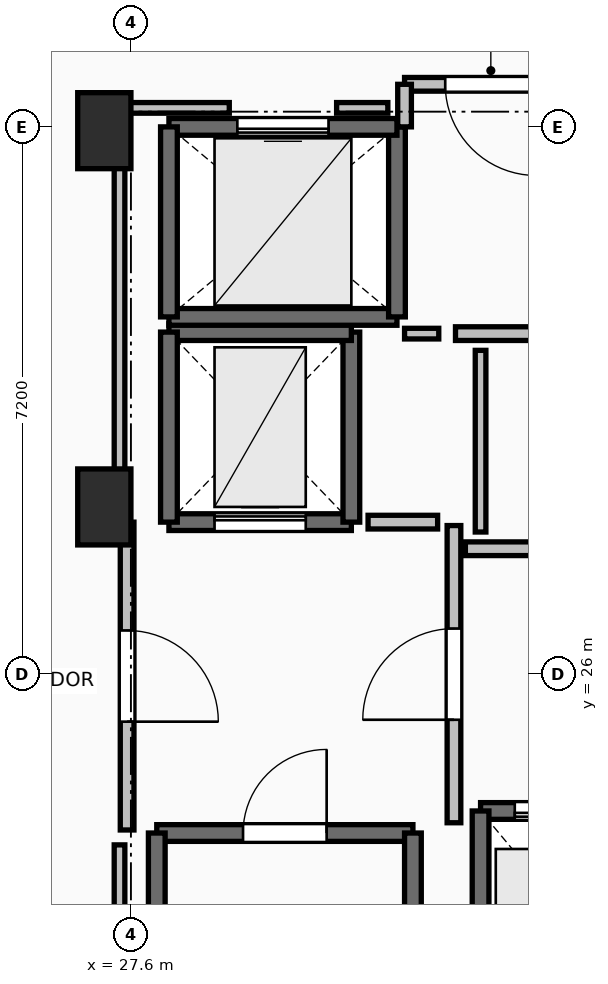
"""IFC4 building model, lengths in metres.
Left out: names, types, materials, properties, quantities, classifications, styles, units other than length and angle.
Written with IfcOpenShell. Run it as: python <this file> out.ifc"""

import sys

from ifc_helpers import new_model, si_unit, direction, frame, frame_2d, origin, origin_2d, place, context, subcontext, project, spatial, rectangle, extrude, element, fill, save


model = new_model("IFC4")
c1 = context("Model", 3, precision=1e-05, world=origin(), true_north=direction((0.0, 1.0)))
c2 = subcontext(c1, "Body", "Model", "MODEL_VIEW")
j1 = project(units=[si_unit("LENGTHUNIT", "METRE"), si_unit("PLANEANGLEUNIT", "RADIAN")], contexts=[c1])
p1 = place(None, origin())
s1 = spatial("IfcSite", under=j1, at=p1, CompositionType="ELEMENT")
p2 = place(p1, origin())
s2 = spatial("IfcBuilding", under=s1, at=p2, CompositionType="ELEMENT")
p3 = place(p2, frame((0.0, 0.0, 214.3)))
s3 = spatial("IfcBuildingStorey", under=s2, at=p3, CompositionType="ELEMENT", Elevation=214.3)
for number, where, z_axis, x_axis in (
    (1, (27.25, 28.2, 0.0), (0.0, 0.0, 1.0), (1.0, 0.0, 0.0)),
    (2, (27.25, 33.15, 0.0), (0.0, 0.0, 1.0), (1.0, 0.0, 0.0)),
):
    element("IfcColumn", number, at=place(p3, frame(where, z_axis=z_axis, x_axis=x_axis)), inside=s3, PredefinedType="PILASTER", context=c2, shape_type="SweptSolid", body=[
        extrude(rectangle(XDim=0.7, YDim=1.0, at=origin_2d()), origin(), (0.0, 0.0, 1.0), 3.55),
    ])
p4 = place(p3, frame((27.94, 23.91, 0.0), z_axis=(0.0, 0.0, 1.0), x_axis=(1.0, 0.0, 0.0)))
e3 = element("IfcWall", 3, at=p4, inside=s3, PredefinedType="SOLIDWALL", context=c2, shape_type="SweptSolid", body=[
    extrude(rectangle(XDim=3.37, YDim=0.22, at=frame_2d((1.685, 0.0))), origin(), (0.0, 0.0, 1.0), 3.29),
])
p5 = place(p4, frame((1.135, 0.0, 0.0)))
e4 = element("IfcOpeningElement", 4, at=p5, cuts=e3, PredefinedType="OPENING", context=c2, shape_type="SweptSolid", body=[
    extrude(rectangle(XDim=1.1, YDim=2.15, at=frame_2d((0.55, 1.075))), frame((0.0, 0.125, 0.0), z_axis=(0.0, -1.0, 0.0), x_axis=(1.0, 0.0, 0.0)), (0.0, 0.0, 1.0), 0.25),
])
for number, where, z_axis, x_axis in (
    (5, (31.31, 23.91, 0.0), (0.0, 0.0, 1.0), (0.0, -1.0, 0.0)),
    (6, (27.94, 16.49, 0.0), (0.0, 0.0, 1.0), (0.0, 1.0, 0.0)),
):
    element("IfcWall", number, at=place(p3, frame(where, z_axis=z_axis, x_axis=x_axis)), inside=s3, PredefinedType="SOLIDWALL", context=c2, shape_type="SweptSolid", body=[
        extrude(rectangle(XDim=7.42, YDim=0.22, at=frame_2d((3.71, 0.0))), origin(), (0.0, 0.0, 1.0), 3.29),
    ])
p6 = place(p3, frame((34.2, 24.2, 0.0), z_axis=(0.0, 0.0, 1.0), x_axis=(-1.0, 0.0, 0.0)))
e7 = element("IfcWall", 7, at=p6, inside=s3, PredefinedType="SOLIDWALL", context=c2, shape_type="SweptSolid", body=[
    extrude(rectangle(XDim=2.0, YDim=0.22, at=frame_2d((1.0, 0.0))), origin(), (0.0, 0.0, 1.0), 3.29),
])
p7 = place(p6, frame((0.45, 0.0, 0.0)))
e8 = element("IfcOpeningElement", 8, at=p7, cuts=e7, PredefinedType="OPENING", context=c2, shape_type="SweptSolid", body=[
    extrude(rectangle(XDim=1.1, YDim=2.2, at=frame_2d((0.55, 1.1))), frame((0.0, 0.125, 0.0), z_axis=(0.0, -1.0, 0.0), x_axis=(1.0, 0.0, 0.0)), (0.0, 0.0, 1.0), 0.25),
])
p8 = place(p3, frame((32.2, 24.2, 0.0), z_axis=(0.0, 0.0, 1.0), x_axis=(0.0, -1.0, 0.0)))
e9 = element("IfcWall", 9, at=p8, inside=s3, PredefinedType="SOLIDWALL", context=c2, shape_type="SweptSolid", body=[
    extrude(rectangle(XDim=2.4, YDim=0.22, at=frame_2d((1.2, 0.0))), origin(), (0.0, 0.0, 1.0), 3.29),
])
p9 = place(p3, frame((28.1, 28.0, 0.0), z_axis=(0.0, 0.0, 1.0), x_axis=(1.0, 0.0, 0.0)))
e10 = element("IfcWall", 10, at=p9, inside=s3, PredefinedType="SHEAR", context=c2, shape_type="SweptSolid", body=[
    extrude(rectangle(XDim=2.4, YDim=0.22, at=frame_2d((1.2, 0.0))), origin(), (0.0, 0.0, 1.0), 3.29),
])
p10 = place(p9, frame((0.6, 0.0, 0.0)))
e11 = element("IfcOpeningElement", 11, at=p10, cuts=e10, PredefinedType="OPENING", context=c2, shape_type="SweptSolid", body=[
    extrude(rectangle(XDim=1.2, YDim=2.2, at=frame_2d((0.6, 1.1))), frame((0.0, 0.125, 0.0), z_axis=(0.0, -1.0, 0.0), x_axis=(1.0, 0.0, 0.0)), (0.0, 0.0, 1.0), 0.25),
])
p11 = place(p3, frame((30.5, 28.0, 0.0), z_axis=(0.0, 0.0, 1.0), x_axis=(0.0, 1.0, 0.0)))
e12 = element("IfcWall", 12, at=p11, inside=s3, PredefinedType="SHEAR", context=c2, shape_type="SweptSolid", body=[
    extrude(rectangle(XDim=2.5, YDim=0.22, at=frame_2d((1.25, 0.0))), origin(), (0.0, 0.0, 1.0), 3.29),
])
p12 = place(p3, frame((30.5, 30.5, 0.0), z_axis=(0.0, 0.0, 1.0), x_axis=(-1.0, 0.0, 0.0)))
e13 = element("IfcWall", 13, at=p12, inside=s3, PredefinedType="SHEAR", context=c2, shape_type="SweptSolid", body=[
    extrude(rectangle(XDim=2.4, YDim=0.22, at=frame_2d((1.2, 0.0))), origin(), (0.0, 0.0, 1.0), 3.29),
])
p13 = place(p3, frame((28.1, 30.5, 0.0), z_axis=(0.0, 0.0, 1.0), x_axis=(0.0, -1.0, 0.0)))
e14 = element("IfcWall", 14, at=p13, inside=s3, PredefinedType="SHEAR", context=c2, shape_type="SweptSolid", body=[
    extrude(rectangle(XDim=2.5, YDim=0.22, at=frame_2d((1.25, 0.0))), origin(), (0.0, 0.0, 1.0), 3.29),
])
p14 = place(p3, frame((28.1, 30.7, 0.0), z_axis=(0.0, 0.0, 1.0), x_axis=(1.0, 0.0, 0.0)))
e15 = element("IfcWall", 15, at=p14, inside=s3, PredefinedType="SOLIDWALL", context=c2, shape_type="SweptSolid", body=[
    extrude(rectangle(XDim=3.0, YDim=0.22, at=frame_2d((1.5, 0.0))), origin(), (0.0, 0.0, 1.0), 3.29),
])
p15 = place(p3, frame((31.1, 30.7, 0.0), z_axis=(0.0, 0.0, 1.0), x_axis=(0.0, 1.0, 0.0)))
e16 = element("IfcWall", 16, at=p15, inside=s3, PredefinedType="SOLIDWALL", context=c2, shape_type="SweptSolid", body=[
    extrude(rectangle(XDim=2.5, YDim=0.22, at=frame_2d((1.25, 0.0))), origin(), (0.0, 0.0, 1.0), 3.29),
])
p16 = place(p3, frame((31.1, 33.2, 0.0), z_axis=(0.0, 0.0, 1.0), x_axis=(-1.0, 0.0, 0.0)))
e17 = element("IfcWall", 17, at=p16, inside=s3, PredefinedType="SOLIDWALL", context=c2, shape_type="SweptSolid", body=[
    extrude(rectangle(XDim=3.0, YDim=0.22, at=frame_2d((1.5, 0.0))), origin(), (0.0, 0.0, 1.0), 3.29),
])
p17 = place(p16, frame((0.9, 0.0, 0.0)))
e18 = element("IfcOpeningElement", 18, at=p17, cuts=e17, PredefinedType="OPENING", context=c2, shape_type="SweptSolid", body=[
    extrude(rectangle(XDim=1.2, YDim=2.2, at=frame_2d((0.6, 1.1))), frame((0.0, 0.125, 0.0), z_axis=(0.0, -1.0, 0.0), x_axis=(1.0, 0.0, 0.0)), (0.0, 0.0, 1.0), 0.25),
])
p18 = place(p3, frame((28.1, 33.2, 0.0), z_axis=(0.0, 0.0, 1.0), x_axis=(0.0, -1.0, 0.0)))
e19 = element("IfcWall", 19, at=p18, inside=s3, PredefinedType="SOLIDWALL", context=c2, shape_type="SweptSolid", body=[
    extrude(rectangle(XDim=2.5, YDim=0.22, at=frame_2d((1.25, 0.0))), origin(), (0.0, 0.0, 1.0), 3.29),
])
p19 = place(p3, frame((31.85, 24.045, 0.0), z_axis=(0.0, 0.0, 1.0), x_axis=(0.0, 1.0, 0.0)))
e20 = element("IfcWall", 20, at=p19, inside=s3, PredefinedType="PARTITIONING", context=c2, shape_type="SweptSolid", body=[
    extrude(rectangle(XDim=3.91, YDim=0.18, at=frame_2d((1.955, 0.0))), origin(), (0.0, 0.0, 1.0), 3.29),
])
p20 = place(p19, frame((1.355, 0.0, 0.0)))
e21 = element("IfcOpeningElement", 21, at=p20, cuts=e20, PredefinedType="OPENING", context=c2, shape_type="SweptSolid", body=[
    extrude(rectangle(XDim=1.2, YDim=2.15, at=frame_2d((0.6, 1.075))), frame((0.0, 0.105, 0.0), z_axis=(0.0, -1.0, 0.0), x_axis=(1.0, 0.0, 0.0)), (0.0, 0.0, 1.0), 0.21),
])
p21 = place(p3, frame((27.55, 28.0, 0.0), z_axis=(0.0, 0.0, 1.0), x_axis=(0.0, -1.0, 0.0)))
e22 = element("IfcWall", 22, at=p21, inside=s3, PredefinedType="PARTITIONING", context=c2, shape_type="SweptSolid", body=[
    extrude(rectangle(XDim=4.05, YDim=0.18, at=frame_2d((2.025, 0.0))), origin(), (0.0, 0.0, 1.0), 3.29),
])
p22 = place(p21, frame((1.425, 0.0, 0.0)))
e23 = element("IfcOpeningElement", 23, at=p22, cuts=e22, PredefinedType="OPENING", context=c2, shape_type="SweptSolid", body=[
    extrude(rectangle(XDim=1.2, YDim=2.15, at=frame_2d((0.6, 1.075))), frame((0.0, 0.105, 0.0), z_axis=(0.0, -1.0, 0.0), x_axis=(1.0, 0.0, 0.0)), (0.0, 0.0, 1.0), 0.21),
])
p23 = place(p3, frame((31.87, 30.48, 0.0), z_axis=(0.0, 0.0, 1.0), x_axis=(1.0, 0.0, 0.0)))
e24 = element("IfcWall", 24, at=p23, inside=s3, PredefinedType="PARTITIONING", context=c2, shape_type="SweptSolid", body=[
    extrude(rectangle(XDim=1.6, YDim=0.18, at=frame_2d((0.8, 0.0))), origin(), (0.0, 0.0, 1.0), 3.29),
])
p24 = place(p3, frame((33.47, 33.76, 0.0), z_axis=(0.0, 0.0, 1.0), x_axis=(-1.0, 0.0, 0.0)))
e25 = element("IfcWall", 25, at=p24, inside=s3, PredefinedType="PARTITIONING", context=c2, shape_type="SweptSolid", body=[
    extrude(rectangle(XDim=2.27, YDim=0.18, at=frame_2d((1.135, 0.0))), origin(), (0.0, 0.0, 1.0), 3.29),
])
p25 = place(p24, frame((0.535, 0.0, 0.0)))
e26 = element("IfcOpeningElement", 26, at=p25, cuts=e25, PredefinedType="OPENING", context=c2, shape_type="SweptSolid", body=[
    extrude(rectangle(XDim=1.2, YDim=2.15, at=frame_2d((0.6, 1.075))), frame((0.0, 0.105, 0.0), z_axis=(0.0, -1.0, 0.0), x_axis=(1.0, 0.0, 0.0)), (0.0, 0.0, 1.0), 0.21),
])
p26 = place(p3, frame((31.2, 33.76, 0.0), z_axis=(0.0, 0.0, 1.0), x_axis=(0.0, -1.0, 0.0)))
e27 = element("IfcWall", 27, at=p26, inside=s3, PredefinedType="PARTITIONING", context=c2, shape_type="SweptSolid", body=[
    extrude(rectangle(XDim=0.56, YDim=0.18, at=frame_2d((0.28, 0.0))), origin(), (0.0, 0.0, 1.0), 3.29),
])
p27 = place(p3, frame((35.04, 27.65, 0.0), z_axis=(0.0, 0.0, 1.0), x_axis=(-1.0, 0.0, 0.0)))
e28 = element("IfcWall", 28, at=p27, inside=s3, PredefinedType="PARTITIONING", context=c2, shape_type="SweptSolid", body=[
    extrude(rectangle(XDim=3.04, YDim=0.18, at=frame_2d((1.52, 0.0))), origin(), (0.0, 0.0, 1.0), 3.29),
])
p28 = place(p27, frame((1.02, 0.0, 0.0)))
e29 = element("IfcOpeningElement", 29, at=p28, cuts=e28, PredefinedType="OPENING", context=c2, shape_type="SweptSolid", body=[
    extrude(rectangle(XDim=1.0, YDim=2.15, at=frame_2d((0.5, 1.075))), frame((0.0, 0.105, 0.0), z_axis=(0.0, -1.0, 0.0), x_axis=(1.0, 0.0, 0.0)), (0.0, 0.0, 1.0), 0.21),
])
p29 = place(p3, frame((31.635, 28.0, 0.0), z_axis=(0.0, 0.0, 1.0), x_axis=(-1.0, 0.0, 0.0)))
e30 = element("IfcWall", 30, at=p29, inside=s3, PredefinedType="PARTITIONING", context=c2, shape_type="SweptSolid", body=[
    extrude(rectangle(XDim=0.915, YDim=0.18, at=frame_2d((0.458, 0.0))), origin(), (0.0, 0.0, 1.0), 3.29),
])
p30 = place(p3, frame((31.2, 30.48, 0.0), z_axis=(0.0, 0.0, 1.0), x_axis=(1.0, 0.0, 0.0)))
e31 = element("IfcWall", 31, at=p30, inside=s3, PredefinedType="PARTITIONING", context=c2, shape_type="SweptSolid", body=[
    extrude(rectangle(XDim=0.45, YDim=0.14, at=frame_2d((0.225, 0.0))), origin(), (0.0, 0.0, 1.0), 3.29),
])
p31 = place(p3, frame((32.2, 30.26, 0.0), z_axis=(0.0, 0.0, 1.0), x_axis=(0.0, -1.0, 0.0)))
e32 = element("IfcWall", 32, at=p31, inside=s3, PredefinedType="PARTITIONING", context=c2, shape_type="SweptSolid", body=[
    extrude(rectangle(XDim=2.39, YDim=0.14, at=frame_2d((1.195, 0.0))), origin(), (0.0, 0.0, 1.0), 3.29),
])
p32 = place(p3, frame((30.98, 33.45, 0.0), z_axis=(0.0, 0.0, 1.0), x_axis=(-1.0, 0.0, 0.0)))
e33 = element("IfcWall", 33, at=p32, inside=s3, PredefinedType="PARTITIONING", context=c2, shape_type="SweptSolid", body=[
    extrude(rectangle(XDim=0.674, YDim=0.14, at=frame_2d((0.337, 0.0))), origin(), (0.0, 0.0, 1.0), 3.29),
])
p33 = place(p3, frame((28.894, 33.45, 0.0), z_axis=(0.0, 0.0, 1.0), x_axis=(-1.0, 0.0, 0.0)))
e34 = element("IfcWall", 34, at=p33, inside=s3, PredefinedType="PARTITIONING", context=c2, shape_type="SweptSolid", body=[
    extrude(rectangle(XDim=1.444, YDim=0.14, at=frame_2d((0.722, 0.0))), origin(), (0.0, 0.0, 1.0), 2.482),
])
p34 = place(p3, frame((27.45, 33.45, 0.0), z_axis=(0.0, 0.0, 1.0), x_axis=(0.0, -1.0, 0.0)))
e35 = element("IfcWall", 35, at=p34, inside=s3, PredefinedType="PARTITIONING", context=c2, shape_type="SweptSolid", body=[
    extrude(rectangle(XDim=5.254, YDim=0.14, at=frame_2d((2.627, 0.0))), origin(), (0.0, 0.0, 1.0), 2.482),
])
p35 = place(p3, frame((27.45, 23.754, 0.0), z_axis=(0.0, 0.0, 1.0), x_axis=(0.0, -1.0, 0.0)))
e36 = element("IfcWall", 36, at=p35, inside=s3, PredefinedType="PARTITIONING", context=c2, shape_type="SweptSolid", body=[
    extrude(rectangle(XDim=7.514, YDim=0.14, at=frame_2d((3.757, 0.0))), origin(), (0.0, 0.0, 1.0), 2.482),
])
p36 = place(p5, origin())
e37 = element("IfcDoor", 37, at=p36, inside=s3, OperationType="SINGLE_SWING_RIGHT", PredefinedType="DOOR", context=c2, shape_type="SweptSolid", body=[
    extrude(rectangle(XDim=1.1, YDim=2.15, at=frame_2d((0.55, 1.075))), frame((0.0, 0.025, 0.0), z_axis=(0.0, -1.0, 0.0), x_axis=(1.0, 0.0, 0.0)), (0.0, 0.0, 1.0), 0.05),
])
fill(e4, e37)
p37 = place(p7, origin())
e38 = element("IfcDoor", 38, at=p37, inside=s3, OperationType="SLIDING_TO_LEFT", PredefinedType="DOOR", context=c2, shape_type="SweptSolid", body=[
    extrude(rectangle(XDim=1.1, YDim=2.2, at=frame_2d((0.55, 1.1))), frame((0.0, 0.025, 0.0), z_axis=(0.0, -1.0, 0.0), x_axis=(1.0, 0.0, 0.0)), (0.0, 0.0, 1.0), 0.05),
])
fill(e8, e38)
p38 = place(p10, origin())
e39 = element("IfcDoor", 39, at=p38, inside=s3, OperationType="SLIDING_TO_LEFT", PredefinedType="DOOR", context=c2, shape_type="SweptSolid", body=[
    extrude(rectangle(XDim=1.2, YDim=2.2, at=frame_2d((0.6, 1.1))), frame((0.0, 0.025, 0.0), z_axis=(0.0, -1.0, 0.0), x_axis=(1.0, 0.0, 0.0)), (0.0, 0.0, 1.0), 0.05),
])
fill(e11, e39)
p39 = place(p17, origin())
e40 = element("IfcDoor", 40, at=p39, inside=s3, OperationType="SLIDING_TO_LEFT", PredefinedType="DOOR", context=c2, shape_type="SweptSolid", body=[
    extrude(rectangle(XDim=1.2, YDim=2.2, at=frame_2d((0.6, 1.1))), frame((0.0, 0.025, 0.0), z_axis=(0.0, -1.0, 0.0), x_axis=(1.0, 0.0, 0.0)), (0.0, 0.0, 1.0), 0.05),
])
fill(e18, e40)
p40 = place(p20, origin())
e41 = element("IfcDoor", 41, at=p40, inside=s3, OperationType="SINGLE_SWING_LEFT", PredefinedType="DOOR", context=c2, shape_type="SweptSolid", body=[
    extrude(rectangle(XDim=1.2, YDim=2.15, at=frame_2d((0.6, 1.075))), frame((0.0, 0.025, 0.0), z_axis=(0.0, -1.0, 0.0), x_axis=(1.0, 0.0, 0.0)), (0.0, 0.0, 1.0), 0.05),
])
fill(e21, e41)
p41 = place(p22, origin())
e42 = element("IfcDoor", 42, at=p41, inside=s3, OperationType="SINGLE_SWING_RIGHT", PredefinedType="DOOR", context=c2, shape_type="SweptSolid", body=[
    extrude(rectangle(XDim=1.2, YDim=2.15, at=frame_2d((0.6, 1.075))), frame((0.0, 0.025, 0.0), z_axis=(0.0, -1.0, 0.0), x_axis=(1.0, 0.0, 0.0)), (0.0, 0.0, 1.0), 0.05),
])
fill(e23, e42)
p42 = place(p25, origin())
e43 = element("IfcDoor", 43, at=p42, inside=s3, OperationType="SINGLE_SWING_LEFT", PredefinedType="DOOR", context=c2, shape_type="SweptSolid", body=[
    extrude(rectangle(XDim=1.2, YDim=2.15, at=frame_2d((0.6, 1.075))), frame((0.0, 0.025, 0.0), z_axis=(0.0, -1.0, 0.0), x_axis=(1.0, 0.0, 0.0)), (0.0, 0.0, 1.0), 0.05),
])
fill(e26, e43)
save(model, sys.argv[1])
